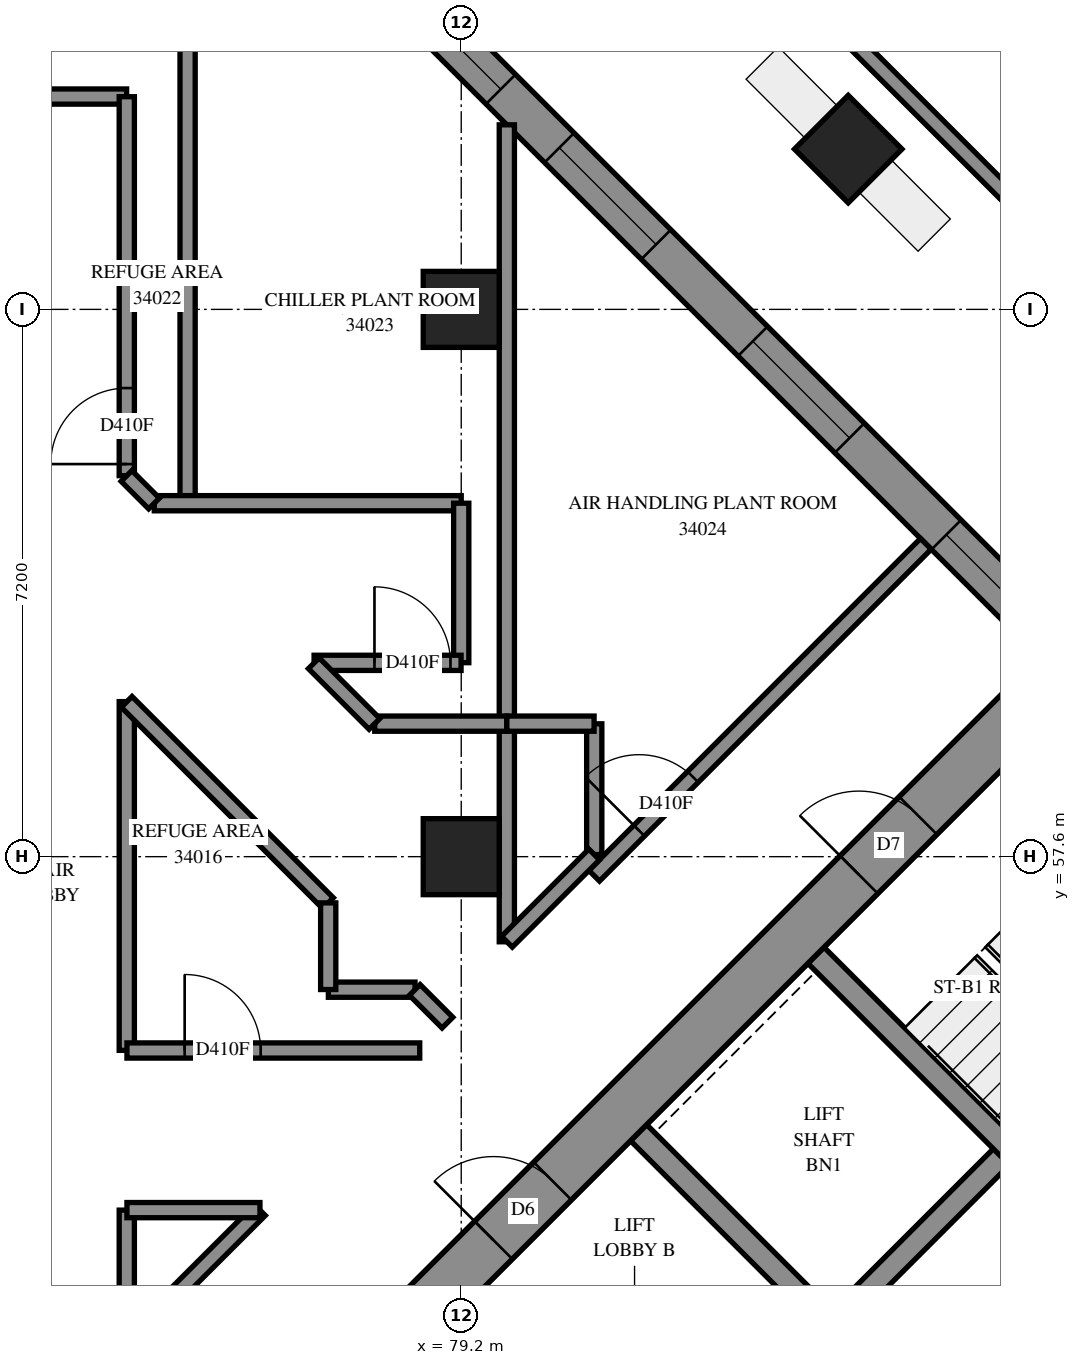
"""IFC4 building model, lengths in metres.
Left out: names, types, materials, properties, quantities, classifications, styles, units other than length and angle.
Written with IfcOpenShell. Run it as: python <this file> out.ifc"""

import sys

from ifc_helpers import new_model, si_unit, direction, frame, frame_2d, origin, origin_2d, place, context, subcontext, project, spatial, polyline, rectangle, outline, extrude, element, fill, save


model = new_model("IFC4")
c1 = context("Model", 3, precision=1e-05, world=origin(), true_north=direction((0.0, 1.0)))
c2 = subcontext(c1, "Body", "Model", "MODEL_VIEW")
j1 = project(units=[si_unit("LENGTHUNIT", "METRE"), si_unit("PLANEANGLEUNIT", "RADIAN")], contexts=[c1])
p1 = place(None, origin())
s1 = spatial("IfcSite", under=j1, at=p1, CompositionType="ELEMENT")
p2 = place(p1, origin())
s2 = spatial("IfcBuilding", under=s1, at=p2, CompositionType="ELEMENT")
p3 = place(p2, frame((0.0, 0.0, 126.2)))
s3 = spatial("IfcBuildingStorey", under=s2, at=p3, CompositionType="ELEMENT", Elevation=126.2)
for number, where, z_axis, x_axis in (
    (1, (79.2, 57.6, 0.0), (0.0, 0.0, 1.0), (1.0, 0.0, 0.0)),
    (2, (79.2, 64.8, 0.0), (0.0, 0.0, 1.0), (1.0, 0.0, 0.0)),
):
    element("IfcColumn", number, at=place(p3, frame(where, z_axis=z_axis, x_axis=x_axis)), inside=s3, PredefinedType="COLUMN", context=c2, shape_type="SweptSolid", body=[
        extrude(rectangle(XDim=1.0, YDim=1.0, at=origin_2d()), origin(), (0.0, 0.0, 1.0), 4.7),
    ])
p4 = place(p3, frame((84.291, 66.909, -0.3), z_axis=(0.0, 0.0, 1.0), x_axis=(0.7071067812, -0.7071067812, 0.0)))
e3 = element("IfcColumn", 3, at=p4, inside=s3, PredefinedType="COLUMN", context=c2, shape_type="SweptSolid", body=[
    extrude(rectangle(XDim=1.0, YDim=1.0, at=origin_2d()), origin(), (0.0, 0.0, 1.0), 5.0),
])
p5 = place(p3, frame((76.407, 49.337, -0.3), z_axis=(0.0, 0.0, 1.0), x_axis=(0.7071067812, 0.7071067812, 0.0)))
e4 = element("IfcWall", 4, at=p5, inside=s3, PredefinedType="SHEAR", context=c2, shape_type="SweptSolid", body=[
    extrude(rectangle(XDim=14.4, YDim=0.7, at=frame_2d((7.2, 0.0))), origin(), (0.0, 0.0, 1.0), 4.3),
])
p6 = place(p5, frame((4.55, 0.0, 0.3)))
e5 = element("IfcOpeningElement", 5, at=p6, cuts=e4, PredefinedType="OPENING", context=c2, shape_type="SweptSolid", body=[
    extrude(rectangle(XDim=1.1, YDim=2.1, at=frame_2d((0.55, 1.05))), frame((0.0, 0.36, 0.0), z_axis=(0.0, -1.0, 0.0), x_axis=(1.0, 0.0, 0.0)), (0.0, 0.0, 1.0), 0.72),
])
p7 = place(p5, frame((11.35, 0.0, 0.3)))
e6 = element("IfcOpeningElement", 6, at=p7, cuts=e4, PredefinedType="OPENING", context=c2, shape_type="SweptSolid", body=[
    extrude(rectangle(XDim=1.1, YDim=2.1, at=frame_2d((0.55, 1.05))), frame((0.0, 0.36, 0.0), z_axis=(0.0, -1.0, 0.0), x_axis=(1.0, 0.0, 0.0)), (0.0, 0.0, 1.0), 0.72),
])
p8 = place(p3, frame((84.079, 51.423, 0.0), z_axis=(0.0, 0.0, 1.0), x_axis=(0.7071219326, 0.7070916295, 0.0)))
e7 = element("IfcWall", 7, at=p8, inside=s3, PredefinedType="SOLIDWALL", context=c2, shape_type="SweptSolid", body=[
    extrude(rectangle(XDim=3.3, YDim=0.3, at=frame_2d((1.65, 0.0))), origin(), (0.0, 0.0, 1.0), 4.7),
])
p9 = place(p3, frame((81.534, 53.969, 0.0), z_axis=(0.0, 0.0, 1.0), x_axis=(0.707103309, -0.7071102534, 0.0)))
e8 = element("IfcWall", 8, at=p9, inside=s3, PredefinedType="SOLIDWALL", context=c2, shape_type="SweptSolid", body=[
    extrude(rectangle(XDim=14.4, YDim=0.3, at=frame_2d((7.2, 0.0))), origin(), (0.0, 0.0, 1.0), 4.7),
])
p10 = place(p9, frame((12.05, 0.0, 0.0)))
e9 = element("IfcOpeningElement", 9, at=p10, cuts=e8, PredefinedType="OPENING", context=c2, shape_type="SweptSolid", body=[
    extrude(rectangle(XDim=1.1, YDim=2.1, at=frame_2d((0.55, 1.05))), frame((0.0, 0.16, 0.0), z_axis=(0.0, -1.0, 0.0), x_axis=(1.0, 0.0, 0.0)), (0.0, 0.0, 1.0), 0.32),
])
p11 = place(p3, frame((83.867, 56.302, 0.0), z_axis=(0.0, 0.0, 1.0), x_axis=(0.7071137256, -0.7070998367, 0.0)))
e10 = element("IfcWall", 10, at=p11, inside=s3, PredefinedType="SOLIDWALL", context=c2, shape_type="SweptSolid", body=[
    extrude(rectangle(XDim=7.2, YDim=0.3, at=frame_2d((3.6, 0.0))), origin(), (0.0, 0.0, 1.0), 4.7),
])
p12 = place(p3, frame((104.267, 43.15, 0.0), z_axis=(0.0, 0.0, 1.0), x_axis=(-0.7071054305, 0.7071081319, 0.0)))
e11 = element("IfcWall", 11, at=p12, inside=s3, PredefinedType="SOLIDWALL", context=c2, shape_type="SweptSolid", body=[
    extrude(outline(polyline([(-0.275, -0.275), (37.131, -0.275), (36.903, 0.275), (0.275, 0.275), (-0.275, -0.275)])), origin(), (0.0, 0.0, 1.0), 4.7),
])
p13 = place(p12, frame((3.325, 0.0, 0.9)))
e12 = element("IfcOpeningElement", 12, at=p13, cuts=e11, PredefinedType="OPENING", context=c2, shape_type="SweptSolid", body=[
    extrude(rectangle(XDim=1.8, YDim=2.4, at=frame_2d((0.9, 1.2))), frame((0.0, 0.285, 0.0), z_axis=(0.0, -1.0, 0.0), x_axis=(1.0, 0.0, 0.0)), (0.0, 0.0, 1.0), 0.57),
])
p14 = place(p12, frame((6.675, 0.0, 0.9)))
e13 = element("IfcOpeningElement", 13, at=p14, cuts=e11, PredefinedType="OPENING", context=c2, shape_type="SweptSolid", body=[
    extrude(rectangle(XDim=1.8, YDim=2.4, at=frame_2d((0.9, 1.2))), frame((0.0, 0.285, 0.0), z_axis=(0.0, -1.0, 0.0), x_axis=(1.0, 0.0, 0.0)), (0.0, 0.0, 1.0), 0.57),
])
p15 = place(p12, frame((24.625, 0.0, 0.9)))
e14 = element("IfcOpeningElement", 14, at=p15, cuts=e11, PredefinedType="OPENING", context=c2, shape_type="SweptSolid", body=[
    extrude(rectangle(XDim=1.8, YDim=2.4, at=frame_2d((0.9, 1.2))), frame((0.0, 0.285, 0.0), z_axis=(0.0, -1.0, 0.0), x_axis=(1.0, 0.0, 0.0)), (0.0, 0.0, 1.0), 0.57),
])
p16 = place(p12, frame((28.225, 0.0, 0.9)))
e15 = element("IfcOpeningElement", 15, at=p16, cuts=e11, PredefinedType="OPENING", context=c2, shape_type="SweptSolid", body=[
    extrude(rectangle(XDim=1.8, YDim=2.4, at=frame_2d((0.9, 1.2))), frame((0.0, 0.285, 0.0), z_axis=(0.0, -1.0, 0.0), x_axis=(1.0, 0.0, 0.0)), (0.0, 0.0, 1.0), 0.57),
])
p17 = place(p12, frame((31.825, 0.0, 0.9)))
e16 = element("IfcOpeningElement", 16, at=p17, cuts=e11, PredefinedType="OPENING", context=c2, shape_type="SweptSolid", body=[
    extrude(rectangle(XDim=1.8, YDim=2.4, at=frame_2d((0.9, 1.2))), frame((0.0, 0.285, 0.0), z_axis=(0.0, -1.0, 0.0), x_axis=(1.0, 0.0, 0.0)), (0.0, 0.0, 1.0), 0.57),
])
p18 = place(p12, frame((34.714, 0.0, 0.9)))
e17 = element("IfcOpeningElement", 17, at=p18, cuts=e11, PredefinedType="OPENING", context=c2, shape_type="SweptSolid", body=[
    extrude(rectangle(XDim=1.8, YDim=2.4, at=frame_2d((0.9, 1.2))), frame((0.0, 0.285, 0.0), z_axis=(0.0, -1.0, 0.0), x_axis=(1.0, 0.0, 0.0)), (0.0, 0.0, 1.0), 0.57),
])
p19 = place(p3, frame((107.838, 44.847, 0.0), z_axis=(0.0, 0.0, 1.0), x_axis=(-0.7071067812, 0.7071067812, 0.0)))
e18 = element("IfcWall", 18, at=p19, inside=s3, PredefinedType="SOLIDWALL", context=c2, shape_type="SweptSolid", body=[
    extrude(outline(polyline([(-0.1, -0.1), (39.926, -0.1), (39.843, 0.1), (0.1, 0.1), (-0.1, -0.1)])), origin(), (0.0, 0.0, 1.0), 4.7),
])
p20 = place(p3, frame((54.8, 67.6, 0.0), z_axis=(0.0, 0.0, 1.0), x_axis=(1.0, 0.0, 0.0)))
e19 = element("IfcWall", 19, at=p20, inside=s3, PredefinedType="PARTITIONING", context=c2, shape_type="SweptSolid", body=[
    extrude(rectangle(XDim=19.998, YDim=0.2, at=frame_2d((9.999, 0.0))), origin(), (0.0, 0.0, 1.0), 4.7),
])
p21 = place(p20, frame((8.738, 0.0, 0.0)))
e20 = element("IfcOpeningElement", 20, at=p21, cuts=e19, PredefinedType="OPENING", context=c2, shape_type="SweptSolid", body=[
    extrude(rectangle(XDim=1.0, YDim=2.1, at=frame_2d((0.5, 1.05))), frame((0.0, 0.11, 0.0), z_axis=(0.0, -1.0, 0.0), x_axis=(1.0, 0.0, 0.0)), (0.0, 0.0, 1.0), 0.22),
])
p22 = place(p3, frame((79.8, 59.35, 0.0), z_axis=(0.0, 0.0, 1.0), x_axis=(0.0, 1.0, 0.0)))
e21 = element("IfcWall", 21, at=p22, inside=s3, PredefinedType="PARTITIONING", context=c2, shape_type="SweptSolid", body=[
    extrude(rectangle(XDim=7.878, YDim=0.2, at=frame_2d((3.939, 0.0))), origin(), (0.0, 0.0, 1.0), 4.7),
])
p23 = place(p3, frame((75.6, 62.25, 0.0), z_axis=(0.0, 0.0, 1.0), x_axis=(0.0, 1.0, 0.0)))
e22 = element("IfcWall", 22, at=p23, inside=s3, PredefinedType="PARTITIONING", context=c2, shape_type="SweptSolid", body=[
    extrude(rectangle(XDim=6.8, YDim=0.2, at=frame_2d((3.4, 0.0))), origin(), (0.0, 0.0, 1.0), 4.7),
])
p24 = place(p3, frame((80.949, 57.349, 0.0), z_axis=(0.0, 0.0, 1.0), x_axis=(0.706944768, 0.7072687573, 0.0)))
e23 = element("IfcWall", 23, at=p24, inside=s3, PredefinedType="PARTITIONING", context=c2, shape_type="SweptSolid", body=[
    extrude(rectangle(XDim=6.173, YDim=0.2, at=frame_2d((3.087, 0.0))), origin(), (0.0, 0.0, 1.0), 4.7),
])
p25 = place(p24, frame((0.838, 0.0, 0.0)))
e24 = element("IfcOpeningElement", 24, at=p25, cuts=e23, PredefinedType="OPENING", context=c2, shape_type="SweptSolid", body=[
    extrude(rectangle(XDim=1.0, YDim=2.1, at=frame_2d((0.5, 1.05))), frame((0.0, 0.11, 0.0), z_axis=(0.0, -1.0, 0.0), x_axis=(1.0, 0.0, 0.0)), (0.0, 0.0, 1.0), 0.22),
])
p26 = place(p3, frame((74.8, 62.612, 0.0), z_axis=(0.0, 0.0, 1.0), x_axis=(0.0, 1.0, 0.0)))
e25 = element("IfcWall", 25, at=p26, inside=s3, PredefinedType="PARTITIONING", context=c2, shape_type="SweptSolid", body=[
    extrude(rectangle(XDim=4.986, YDim=0.2, at=frame_2d((2.493, 0.0))), origin(), (0.0, 0.0, 1.0), 4.7),
])
p27 = place(p26, frame((0.153, 0.0, 0.0)))
e26 = element("IfcOpeningElement", 26, at=p27, cuts=e25, PredefinedType="OPENING", context=c2, shape_type="SweptSolid", body=[
    extrude(rectangle(XDim=1.0, YDim=2.1, at=frame_2d((0.5, 1.05))), frame((0.0, 0.11, 0.0), z_axis=(0.0, -1.0, 0.0), x_axis=(1.0, 0.0, 0.0)), (0.0, 0.0, 1.0), 0.22),
])
p28 = place(p3, frame((74.8, 55.052, 0.0), z_axis=(0.0, 0.0, 1.0), x_axis=(0.0, 1.0, 0.0)))
e27 = element("IfcWall", 27, at=p28, inside=s3, PredefinedType="PARTITIONING", context=c2, shape_type="SweptSolid", body=[
    extrude(rectangle(XDim=4.588, YDim=0.2, at=frame_2d((2.294, 0.0))), origin(), (0.0, 0.0, 1.0), 4.7),
])
p29 = place(p3, frame((75.162, 62.25, 0.0), z_axis=(0.0, 0.0, 1.0), x_axis=(1.0, 0.0, 0.0)))
e28 = element("IfcWall", 28, at=p29, inside=s3, PredefinedType="PARTITIONING", context=c2, shape_type="SweptSolid", body=[
    extrude(rectangle(XDim=4.038, YDim=0.2, at=frame_2d((2.019, 0.0))), origin(), (0.0, 0.0, 1.0), 4.7),
])
p30 = place(p3, frame((74.802, 55.05, 0.0), z_axis=(0.0, 0.0, 1.0), x_axis=(1.0, 0.0, 0.0)))
e29 = element("IfcWall", 29, at=p30, inside=s3, PredefinedType="PARTITIONING", context=c2, shape_type="SweptSolid", body=[
    extrude(rectangle(XDim=3.852, YDim=0.2, at=frame_2d((1.926, 0.0))), origin(), (0.0, 0.0, 1.0), 4.7),
])
p31 = place(p30, frame((0.759, 0.0, 0.0)))
e30 = element("IfcOpeningElement", 30, at=p31, cuts=e29, PredefinedType="OPENING", context=c2, shape_type="SweptSolid", body=[
    extrude(rectangle(XDim=1.0, YDim=2.1, at=frame_2d((0.5, 1.05))), frame((0.0, 0.11, 0.0), z_axis=(0.0, -1.0, 0.0), x_axis=(1.0, 0.0, 0.0)), (0.0, 0.0, 1.0), 0.22),
])
p32 = place(p3, frame((74.799, 59.637, 0.0), z_axis=(0.0, 0.0, 1.0), x_axis=(0.7071067812, -0.7071067812, 0.0)))
e31 = element("IfcWall", 31, at=p32, inside=s3, PredefinedType="PARTITIONING", context=c2, shape_type="SweptSolid", body=[
    extrude(rectangle(XDim=3.745, YDim=0.2, at=frame_2d((1.872, 0.0))), origin(), (0.0, 0.0, 1.0), 4.7),
])
p33 = place(p3, frame((79.8, 56.48, 0.0), z_axis=(0.0, 0.0, 1.0), x_axis=(0.0, 1.0, 0.0)))
e32 = element("IfcWall", 32, at=p33, inside=s3, PredefinedType="PARTITIONING", context=c2, shape_type="SweptSolid", body=[
    extrude(rectangle(XDim=2.87, YDim=0.2, at=frame_2d((1.435, 0.0))), origin(), (0.0, 0.0, 1.0), 4.7),
])
p34 = place(p3, frame((74.998, 51.398, 0.0), z_axis=(0.0, 0.0, 1.0), x_axis=(0.7075619512, 0.706651318, 0.0)))
e33 = element("IfcWall", 33, at=p34, inside=s3, PredefinedType="PARTITIONING", context=c2, shape_type="SweptSolid", body=[
    extrude(rectangle(XDim=2.196, YDim=0.2, at=frame_2d((1.098, 0.0))), origin(), (0.0, 0.0, 1.0), 4.7),
])
p35 = place(p3, frame((79.2, 60.152, 0.0), z_axis=(0.0, 0.0, 1.0), x_axis=(0.0, 1.0, 0.0)))
e34 = element("IfcWall", 34, at=p35, inside=s3, PredefinedType="PARTITIONING", context=c2, shape_type="SweptSolid", body=[
    extrude(rectangle(XDim=2.098, YDim=0.2, at=frame_2d((1.049, 0.0))), origin(), (0.0, 0.0, 1.0), 4.7),
])
p36 = place(p3, frame((77.264, 60.15, 0.0), z_axis=(0.0, 0.0, 1.0), x_axis=(1.0, 0.0, 0.0)))
e35 = element("IfcWall", 35, at=p36, inside=s3, PredefinedType="PARTITIONING", context=c2, shape_type="SweptSolid", body=[
    extrude(rectangle(XDim=1.934, YDim=0.2, at=frame_2d((0.967, 0.0))), origin(), (0.0, 0.0, 1.0), 4.7),
])
p37 = place(p36, frame((0.794, 0.0, 0.0)))
e36 = element("IfcOpeningElement", 36, at=p37, cuts=e35, PredefinedType="OPENING", context=c2, shape_type="SweptSolid", body=[
    extrude(rectangle(XDim=1.0, YDim=2.1, at=frame_2d((0.5, 1.05))), frame((0.0, 0.11, 0.0), z_axis=(0.0, -1.0, 0.0), x_axis=(1.0, 0.0, 0.0)), (0.0, 0.0, 1.0), 0.22),
])
p38 = place(p3, frame((74.8, 51.198, 0.0), z_axis=(0.0, 0.0, 1.0), x_axis=(0.0, 1.0, 0.0)))
e37 = element("IfcWall", 37, at=p38, inside=s3, PredefinedType="PARTITIONING", context=c2, shape_type="SweptSolid", body=[
    extrude(rectangle(XDim=1.752, YDim=0.2, at=frame_2d((0.876, 0.0))), origin(), (0.0, 0.0, 1.0), 4.7),
])
p39 = place(p3, frame((74.802, 52.95, 0.0), z_axis=(0.0, 0.0, 1.0), x_axis=(1.0, 0.0, 0.0)))
e38 = element("IfcWall", 38, at=p39, inside=s3, PredefinedType="PARTITIONING", context=c2, shape_type="SweptSolid", body=[
    extrude(rectangle(XDim=1.75, YDim=0.2, at=frame_2d((0.875, 0.0))), origin(), (0.0, 0.0, 1.0), 4.7),
])
p40 = place(p3, frame((78.062, 59.35, 0.0), z_axis=(0.0, 0.0, 1.0), x_axis=(1.0, 0.0, 0.0)))
e39 = element("IfcWall", 39, at=p40, inside=s3, PredefinedType="PARTITIONING", context=c2, shape_type="SweptSolid", body=[
    extrude(rectangle(XDim=1.738, YDim=0.2, at=frame_2d((0.869, 0.0))), origin(), (0.0, 0.0, 1.0), 4.7),
])
p41 = place(p3, frame((80.95, 57.628, 0.0), z_axis=(0.0, 0.0, 1.0), x_axis=(0.0, 1.0, 0.0)))
e40 = element("IfcWall", 40, at=p41, inside=s3, PredefinedType="PARTITIONING", context=c2, shape_type="SweptSolid", body=[
    extrude(rectangle(XDim=1.72, YDim=0.2, at=frame_2d((0.86, 0.0))), origin(), (0.0, 0.0, 1.0), 4.7),
])
p42 = place(p3, frame((79.801, 56.481, 0.0), z_axis=(0.0, 0.0, 1.0), x_axis=(0.7071067812, 0.7071067812, 0.0)))
e41 = element("IfcWall", 41, at=p42, inside=s3, PredefinedType="PARTITIONING", context=c2, shape_type="SweptSolid", body=[
    extrude(rectangle(XDim=1.623, YDim=0.2, at=frame_2d((0.812, 0.0))), origin(), (0.0, 0.0, 1.0), 4.7),
])
p43 = place(p3, frame((79.8, 59.35, 0.0), z_axis=(0.0, 0.0, 1.0), x_axis=(1.0, 0.0, 0.0)))
e42 = element("IfcWall", 42, at=p43, inside=s3, PredefinedType="PARTITIONING", context=c2, shape_type="SweptSolid", body=[
    extrude(rectangle(XDim=1.148, YDim=0.2, at=frame_2d((0.574, 0.0))), origin(), (0.0, 0.0, 1.0), 4.7),
])
for number, where, z_axis, x_axis in (
    (43, (77.452, 55.85, 0.0), (0.0, 0.0, 1.0), (1.0, 0.0, 0.0)),
    (44, (77.45, 55.852, 0.0), (0.0, 0.0, 1.0), (0.0, 1.0, 0.0)),
):
    element("IfcWall", number, at=place(p3, frame(where, z_axis=z_axis, x_axis=x_axis)), inside=s3, PredefinedType="PARTITIONING", context=c2, shape_type="SweptSolid", body=[
        extrude(rectangle(XDim=1.14, YDim=0.2, at=frame_2d((0.57, 0.0))), origin(), (0.0, 0.0, 1.0), 4.7),
    ])
p44 = place(p3, frame((77.26, 60.145, 0.0), z_axis=(0.0, 0.0, 1.0), x_axis=(0.7071067812, -0.7071067812, 0.0)))
e45 = element("IfcWall", 45, at=p44, inside=s3, PredefinedType="PARTITIONING", context=c2, shape_type="SweptSolid", body=[
    extrude(rectangle(XDim=1.129, YDim=0.2, at=frame_2d((0.564, 0.0))), origin(), (0.0, 0.0, 1.0), 4.7),
])
p45 = place(p3, frame((78.589, 55.847, 0.0), z_axis=(0.0, 0.0, 1.0), x_axis=(0.7071067812, -0.7071067812, 0.0)))
e46 = element("IfcWall", 46, at=p45, inside=s3, PredefinedType="PARTITIONING", context=c2, shape_type="SweptSolid", body=[
    extrude(rectangle(XDim=0.608, YDim=0.2, at=frame_2d((0.304, 0.0))), origin(), (0.0, 0.0, 1.0), 4.7),
])
p46 = place(p3, frame((74.796, 62.608, 0.0), z_axis=(0.0, 0.0, 1.0), x_axis=(0.7071067812, -0.7071067812, 0.0)))
e47 = element("IfcWall", 47, at=p46, inside=s3, PredefinedType="PARTITIONING", context=c2, shape_type="SweptSolid", body=[
    extrude(rectangle(XDim=0.512, YDim=0.2, at=frame_2d((0.256, 0.0))), origin(), (0.0, 0.0, 1.0), 4.7),
])
p47 = place(p15, origin())
e48 = element("IfcWindow", 48, at=p47, inside=s3, PartitioningType="SINGLE_PANEL", PredefinedType="WINDOW", context=c2, shape_type="SweptSolid", body=[
    extrude(rectangle(XDim=1.8, YDim=2.4, at=frame_2d((0.9, 1.2))), frame((0.0, 0.155, 0.0), z_axis=(0.0, -1.0, 0.0), x_axis=(1.0, 0.0, 0.0)), (0.0, 0.0, 1.0), 0.06),
])
fill(e14, e48)
p48 = place(p16, origin())
e49 = element("IfcWindow", 49, at=p48, inside=s3, PartitioningType="SINGLE_PANEL", PredefinedType="WINDOW", context=c2, shape_type="SweptSolid", body=[
    extrude(rectangle(XDim=1.8, YDim=2.4, at=frame_2d((0.9, 1.2))), frame((0.0, 0.155, 0.0), z_axis=(0.0, -1.0, 0.0), x_axis=(1.0, 0.0, 0.0)), (0.0, 0.0, 1.0), 0.06),
])
fill(e15, e49)
p49 = place(p17, origin())
e50 = element("IfcWindow", 50, at=p49, inside=s3, PartitioningType="SINGLE_PANEL", PredefinedType="WINDOW", context=c2, shape_type="SweptSolid", body=[
    extrude(rectangle(XDim=1.8, YDim=2.4, at=frame_2d((0.9, 1.2))), frame((0.0, 0.155, 0.0), z_axis=(0.0, -1.0, 0.0), x_axis=(1.0, 0.0, 0.0)), (0.0, 0.0, 1.0), 0.06),
])
fill(e16, e50)
p50 = place(p18, origin())
e51 = element("IfcWindow", 51, at=p50, inside=s3, PartitioningType="SINGLE_PANEL", PredefinedType="WINDOW", context=c2, shape_type="SweptSolid", body=[
    extrude(rectangle(XDim=1.8, YDim=2.4, at=frame_2d((0.9, 1.2))), frame((0.0, 0.155, 0.0), z_axis=(0.0, -1.0, 0.0), x_axis=(1.0, 0.0, 0.0)), (0.0, 0.0, 1.0), 0.06),
])
fill(e17, e51)
p51 = place(p6, origin())
e52 = element("IfcDoor", 52, at=p51, inside=s3, OperationType="DOUBLE_DOOR_SINGLE_SWING", PredefinedType="DOOR", context=c2, shape_type="SweptSolid", body=[
    extrude(rectangle(XDim=1.1, YDim=2.1, at=frame_2d((0.55, 1.05))), frame((0.0, 0.025, 0.0), z_axis=(0.0, -1.0, 0.0), x_axis=(1.0, 0.0, 0.0)), (0.0, 0.0, 1.0), 0.05),
])
fill(e5, e52)
p52 = place(p7, origin())
e53 = element("IfcDoor", 53, at=p52, inside=s3, OperationType="SINGLE_SWING_LEFT", PredefinedType="DOOR", context=c2, shape_type="SweptSolid", body=[
    extrude(rectangle(XDim=1.1, YDim=2.1, at=frame_2d((0.55, 1.05))), frame((0.0, 0.025, 0.0), z_axis=(0.0, -1.0, 0.0), x_axis=(1.0, 0.0, 0.0)), (0.0, 0.0, 1.0), 0.05),
])
fill(e6, e53)
p53 = place(p31, origin())
e54 = element("IfcDoor", 54, at=p53, inside=s3, OperationType="SINGLE_SWING_LEFT", PredefinedType="DOOR", context=c2, shape_type="SweptSolid", body=[
    extrude(rectangle(XDim=1.0, YDim=2.1, at=frame_2d((0.5, 1.05))), frame((0.0, 0.025, 0.0), z_axis=(0.0, -1.0, 0.0), x_axis=(1.0, 0.0, 0.0)), (0.0, 0.0, 1.0), 0.05),
])
fill(e30, e54)
p54 = place(p27, origin())
e55 = element("IfcDoor", 55, at=p54, inside=s3, OperationType="SINGLE_SWING_LEFT", PredefinedType="DOOR", context=c2, shape_type="SweptSolid", body=[
    extrude(rectangle(XDim=1.0, YDim=2.1, at=frame_2d((0.5, 1.05))), frame((0.0, 0.025, 0.0), z_axis=(0.0, -1.0, 0.0), x_axis=(1.0, 0.0, 0.0)), (0.0, 0.0, 1.0), 0.05),
])
fill(e26, e55)
p55 = place(p37, origin())
e56 = element("IfcDoor", 56, at=p55, inside=s3, OperationType="SINGLE_SWING_LEFT", PredefinedType="DOOR", context=c2, shape_type="SweptSolid", body=[
    extrude(rectangle(XDim=1.0, YDim=2.1, at=frame_2d((0.5, 1.05))), frame((0.0, 0.025, 0.0), z_axis=(0.0, -1.0, 0.0), x_axis=(1.0, 0.0, 0.0)), (0.0, 0.0, 1.0), 0.05),
])
fill(e36, e56)
p56 = place(p25, origin())
e57 = element("IfcDoor", 57, at=p56, inside=s3, OperationType="SINGLE_SWING_RIGHT", PredefinedType="DOOR", context=c2, shape_type="SweptSolid", body=[
    extrude(rectangle(XDim=1.0, YDim=2.1, at=frame_2d((0.5, 1.05))), frame((0.0, 0.025, 0.0), z_axis=(0.0, -1.0, 0.0), x_axis=(1.0, 0.0, 0.0)), (0.0, 0.0, 1.0), 0.05),
])
fill(e24, e57)
save(model, sys.argv[1])
